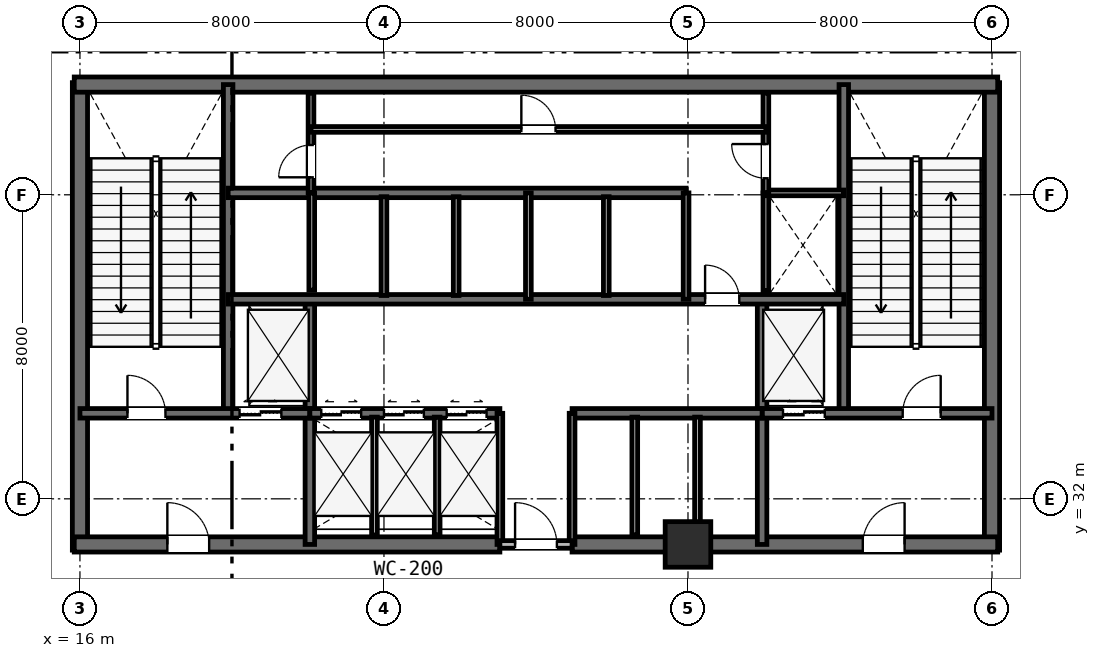
"""IFC4 building model, lengths in metres.
Left out: names, types, materials, properties, quantities, classifications, styles, units other than length and angle.
Written with IfcOpenShell. Run it as: python <this file> out.ifc"""

import sys

from ifc_helpers import new_model, si_unit, direction, frame, frame_2d, origin, origin_2d, place, context, subcontext, project, spatial, rectangle, extrude, element, fill, save


model = new_model("IFC4")
c1 = context("Model", 3, precision=1e-05, world=origin(), true_north=direction((0.0, 1.0)))
c2 = subcontext(c1, "Body", "Model", "MODEL_VIEW")
j1 = project(units=[si_unit("LENGTHUNIT", "METRE"), si_unit("PLANEANGLEUNIT", "RADIAN")], contexts=[c1])
p1 = place(None, origin())
s1 = spatial("IfcSite", under=j1, at=p1, CompositionType="ELEMENT")
p2 = place(p1, origin())
s2 = spatial("IfcBuilding", under=s1, at=p2, CompositionType="ELEMENT")
p3 = place(p2, frame((0.0, 0.0, -5.6)))
s3 = spatial("IfcBuildingStorey", under=s2, at=p3, CompositionType="ELEMENT", Elevation=-5.6)
for number, where, z_axis, x_axis in (
    (1, (16.0, 30.65, 0.0), (0.0, 0.0, 1.0), (0.0, 1.0, 0.0)),
    (2, (40.0, 30.65, 0.0), (0.0, 0.0, 1.0), (0.0, 1.0, 0.0)),
):
    element("IfcWall", number, at=place(p3, frame(where, z_axis=z_axis, x_axis=x_axis)), inside=s3, PredefinedType="SHEAR", context=c2, shape_type="SweptSolid", body=[
        extrude(rectangle(XDim=12.3, YDim=0.4, at=frame_2d((6.15, 0.0))), origin(), (0.0, 0.0, 1.0), 5.6),
    ])
p4 = place(p3, frame((15.85, 42.9, 0.0), z_axis=(0.0, 0.0, 1.0), x_axis=(1.0, 0.0, 0.0)))
e3 = element("IfcWall", 3, at=p4, inside=s3, PredefinedType="SHEAR", context=c2, shape_type="SweptSolid", body=[
    extrude(rectangle(XDim=24.3, YDim=0.4, at=frame_2d((12.15, 0.0))), origin(), (0.0, 0.0, 1.0), 5.6),
])
p5 = place(p3, frame((15.85, 30.8, 0.0), z_axis=(0.0, 0.0, 1.0), x_axis=(1.0, 0.0, 0.0)))
e4 = element("IfcWall", 4, at=p5, inside=s3, PredefinedType="SHEAR", context=c2, shape_type="SweptSolid", body=[
    extrude(rectangle(XDim=11.2, YDim=0.4, at=frame_2d((5.6, 0.0))), origin(), (0.0, 0.0, 1.0), 5.6),
])
p6 = place(p5, frame((2.45, 0.0, 0.0)))
e5 = element("IfcOpeningElement", 5, at=p6, cuts=e4, PredefinedType="OPENING", context=c2, shape_type="SweptSolid", body=[
    extrude(rectangle(XDim=1.1, YDim=2.15, at=frame_2d((0.55, 1.075))), frame((0.0, 0.21, 0.0), z_axis=(0.0, -1.0, 0.0), x_axis=(1.0, 0.0, 0.0)), (0.0, 0.0, 1.0), 0.42),
])
p7 = place(p3, frame((28.95, 30.8, 0.0), z_axis=(0.0, 0.0, 1.0), x_axis=(1.0, 0.0, 0.0)))
e6 = element("IfcWall", 6, at=p7, inside=s3, PredefinedType="SHEAR", context=c2, shape_type="SweptSolid", body=[
    extrude(rectangle(XDim=11.2, YDim=0.4, at=frame_2d((5.6, 0.0))), origin(), (0.0, 0.0, 1.0), 5.6),
])
p8 = place(p7, frame((7.65, 0.0, 0.0)))
e7 = element("IfcOpeningElement", 7, at=p8, cuts=e6, PredefinedType="OPENING", context=c2, shape_type="SweptSolid", body=[
    extrude(rectangle(XDim=1.1, YDim=2.15, at=frame_2d((0.55, 1.075))), frame((0.0, 0.21, 0.0), z_axis=(0.0, -1.0, 0.0), x_axis=(1.0, 0.0, 0.0)), (0.0, 0.0, 1.0), 0.42),
])
for number, where, z_axis, x_axis in (
    (8, (19.9, 34.25, 0.0), (0.0, 0.0, 1.0), (0.0, 1.0, 0.0)),
    (9, (36.1, 34.25, 0.0), (0.0, 0.0, 1.0), (0.0, 1.0, 0.0)),
):
    element("IfcWall", number, at=place(p3, frame(where, z_axis=z_axis, x_axis=x_axis)), inside=s3, PredefinedType="SHEAR", context=c2, shape_type="SweptSolid", body=[
        extrude(rectangle(XDim=8.65, YDim=0.25, at=frame_2d((4.325, 0.0))), origin(), (0.0, 0.0, 1.0), 5.6),
    ])
for number, where, z_axis, x_axis in (
    (10, (22.05, 30.8, 0.0), (0.0, 0.0, 1.0), (0.0, 1.0, 0.0)),
    (11, (33.95, 30.8, 0.0), (0.0, 0.0, 1.0), (0.0, 1.0, 0.0)),
):
    element("IfcWall", number, at=place(p3, frame(where, z_axis=z_axis, x_axis=x_axis)), inside=s3, PredefinedType="SHEAR", context=c2, shape_type="SweptSolid", body=[
        extrude(rectangle(XDim=6.45, YDim=0.25, at=frame_2d((3.225, 0.0))), origin(), (0.0, 0.0, 1.0), 5.6),
    ])
p9 = place(p3, frame((16.0, 34.25, 0.0), z_axis=(0.0, 0.0, 1.0), x_axis=(1.0, 0.0, 0.0)))
e12 = element("IfcWall", 12, at=p9, inside=s3, PredefinedType="SHEAR", context=c2, shape_type="SweptSolid", body=[
    extrude(rectangle(XDim=6.05, YDim=0.25, at=frame_2d((3.025, 0.0))), origin(), (0.0, 0.0, 1.0), 5.6),
])
p10 = place(p9, frame((1.25, 0.0, 0.0)))
e13 = element("IfcOpeningElement", 13, at=p10, cuts=e12, PredefinedType="OPENING", context=c2, shape_type="SweptSolid", body=[
    extrude(rectangle(XDim=1.0, YDim=2.15, at=frame_2d((0.5, 1.075))), frame((0.0, 0.135, 0.0), z_axis=(0.0, -1.0, 0.0), x_axis=(1.0, 0.0, 0.0)), (0.0, 0.0, 1.0), 0.27),
])
p11 = place(p9, frame((4.2, 0.0, 0.0)))
e14 = element("IfcOpeningElement", 14, at=p11, cuts=e12, PredefinedType="OPENING", context=c2, shape_type="SweptSolid", body=[
    extrude(rectangle(XDim=1.1, YDim=2.15, at=frame_2d((0.55, 1.075))), frame((0.0, 0.135, 0.0), z_axis=(0.0, -1.0, 0.0), x_axis=(1.0, 0.0, 0.0)), (0.0, 0.0, 1.0), 0.27),
])
p12 = place(p3, frame((33.95, 34.25, 0.0), z_axis=(0.0, 0.0, 1.0), x_axis=(1.0, 0.0, 0.0)))
e15 = element("IfcWall", 15, at=p12, inside=s3, PredefinedType="SHEAR", context=c2, shape_type="SweptSolid", body=[
    extrude(rectangle(XDim=6.05, YDim=0.25, at=frame_2d((3.025, 0.0))), origin(), (0.0, 0.0, 1.0), 5.6),
])
p13 = place(p12, frame((3.7, 0.0, 0.0)))
e16 = element("IfcOpeningElement", 16, at=p13, cuts=e15, PredefinedType="OPENING", context=c2, shape_type="SweptSolid", body=[
    extrude(rectangle(XDim=1.0, YDim=2.15, at=frame_2d((0.5, 1.075))), frame((0.0, 0.135, 0.0), z_axis=(0.0, -1.0, 0.0), x_axis=(1.0, 0.0, 0.0)), (0.0, 0.0, 1.0), 0.27),
])
p14 = place(p12, frame((0.55, 0.0, 0.0)))
e17 = element("IfcOpeningElement", 17, at=p14, cuts=e15, PredefinedType="OPENING", context=c2, shape_type="SweptSolid", body=[
    extrude(rectangle(XDim=1.1, YDim=2.15, at=frame_2d((0.55, 1.075))), frame((0.0, 0.135, 0.0), z_axis=(0.0, -1.0, 0.0), x_axis=(1.0, 0.0, 0.0)), (0.0, 0.0, 1.0), 0.27),
])
p15 = place(p3, frame((22.05, 34.25, 0.0), z_axis=(0.0, 0.0, 1.0), x_axis=(1.0, 0.0, 0.0)))
e18 = element("IfcWall", 18, at=p15, inside=s3, PredefinedType="SHEAR", context=c2, shape_type="SweptSolid", body=[
    extrude(rectangle(XDim=5.0, YDim=0.25, at=frame_2d((2.5, 0.0))), origin(), (0.0, 0.0, 1.0), 5.6),
])
p16 = place(p15, frame((0.3, 0.0, 0.0)))
e19 = element("IfcOpeningElement", 19, at=p16, cuts=e18, PredefinedType="OPENING", context=c2, shape_type="SweptSolid", body=[
    extrude(rectangle(XDim=1.05, YDim=2.15, at=frame_2d((0.525, 1.075))), frame((0.0, 0.135, 0.0), z_axis=(0.0, -1.0, 0.0), x_axis=(1.0, 0.0, 0.0)), (0.0, 0.0, 1.0), 0.27),
])
p17 = place(p15, frame((1.95, 0.0, 0.0)))
e20 = element("IfcOpeningElement", 20, at=p17, cuts=e18, PredefinedType="OPENING", context=c2, shape_type="SweptSolid", body=[
    extrude(rectangle(XDim=1.05, YDim=2.15, at=frame_2d((0.525, 1.075))), frame((0.0, 0.135, 0.0), z_axis=(0.0, -1.0, 0.0), x_axis=(1.0, 0.0, 0.0)), (0.0, 0.0, 1.0), 0.27),
])
p18 = place(p15, frame((3.6, 0.0, 0.0)))
e21 = element("IfcOpeningElement", 21, at=p18, cuts=e18, PredefinedType="OPENING", context=c2, shape_type="SweptSolid", body=[
    extrude(rectangle(XDim=1.05, YDim=2.15, at=frame_2d((0.525, 1.075))), frame((0.0, 0.135, 0.0), z_axis=(0.0, -1.0, 0.0), x_axis=(1.0, 0.0, 0.0)), (0.0, 0.0, 1.0), 0.27),
])
p19 = place(p3, frame((28.95, 34.25, 0.0), z_axis=(0.0, 0.0, 1.0), x_axis=(1.0, 0.0, 0.0)))
e22 = element("IfcWall", 22, at=p19, inside=s3, PredefinedType="SHEAR", context=c2, shape_type="SweptSolid", body=[
    extrude(rectangle(XDim=5.0, YDim=0.25, at=frame_2d((2.5, 0.0))), origin(), (0.0, 0.0, 1.0), 5.6),
])
p20 = place(p3, frame((19.9, 37.25, 0.0), z_axis=(0.0, 0.0, 1.0), x_axis=(1.0, 0.0, 0.0)))
e23 = element("IfcWall", 23, at=p20, inside=s3, PredefinedType="SHEAR", context=c2, shape_type="SweptSolid", body=[
    extrude(rectangle(XDim=16.2, YDim=0.25, at=frame_2d((8.1, 0.0))), origin(), (0.0, 0.0, 1.0), 5.6),
])
p21 = place(p20, frame((12.55, 0.0, 0.0)))
e24 = element("IfcOpeningElement", 24, at=p21, cuts=e23, PredefinedType="OPENING", context=c2, shape_type="SweptSolid", body=[
    extrude(rectangle(XDim=0.9, YDim=2.15, at=frame_2d((0.45, 1.075))), frame((0.0, 0.135, 0.0), z_axis=(0.0, -1.0, 0.0), x_axis=(1.0, 0.0, 0.0)), (0.0, 0.0, 1.0), 0.27),
])
p22 = place(p3, frame((19.9, 40.05, 0.0), z_axis=(0.0, 0.0, 1.0), x_axis=(1.0, 0.0, 0.0)))
e25 = element("IfcWall", 25, at=p22, inside=s3, PredefinedType="SHEAR", context=c2, shape_type="SweptSolid", body=[
    extrude(rectangle(XDim=12.05, YDim=0.25, at=frame_2d((6.025, 0.0))), origin(), (0.0, 0.0, 1.0), 5.6),
])
p23 = place(p3, frame((32.0, 30.8, 0.0), z_axis=(0.0, 0.0, 1.0), x_axis=(1.0, 0.0, 0.0)))
e26 = element("IfcColumn", 26, at=p23, inside=s3, PredefinedType="COLUMN", context=c2, shape_type="SweptSolid", body=[
    extrude(rectangle(XDim=1.2, YDim=1.2, at=origin_2d()), origin(), (0.0, 0.0, 1.0), 5.6),
])
p24 = place(p3, frame((27.05, 30.8, 0.0), z_axis=(0.0, 0.0, 1.0), x_axis=(0.0, 1.0, 0.0)))
e27 = element("IfcWall", 27, at=p24, inside=s3, PredefinedType="PLUMBINGWALL", context=c2, shape_type="SweptSolid", body=[
    extrude(rectangle(XDim=3.45, YDim=0.15, at=frame_2d((1.725, 0.0))), origin(), (0.0, 0.0, 1.0), 5.01),
])
p25 = place(p3, frame((28.95, 30.8, 0.0), z_axis=(0.0, 0.0, 1.0), x_axis=(0.0, 1.0, 0.0)))
e28 = element("IfcWall", 28, at=p25, inside=s3, PredefinedType="PLUMBINGWALL", context=c2, shape_type="SweptSolid", body=[
    extrude(rectangle(XDim=3.45, YDim=0.15, at=frame_2d((1.725, 0.0))), origin(), (0.0, 0.0, 1.0), 4.76),
])
p26 = place(p3, frame((27.05, 30.8, 0.0), z_axis=(0.0, 0.0, 1.0), x_axis=(1.0, 0.0, 0.0)))
e29 = element("IfcWall", 29, at=p26, inside=s3, PredefinedType="PARTITIONING", context=c2, shape_type="SweptSolid", body=[
    extrude(rectangle(XDim=1.9, YDim=0.2, at=frame_2d((0.95, 0.0))), origin(), (0.0, 0.0, 1.0), 4.76),
])
p27 = place(p26, frame((0.4, 0.0, 0.0)))
e30 = element("IfcOpeningElement", 30, at=p27, cuts=e29, PredefinedType="OPENING", context=c2, shape_type="SweptSolid", body=[
    extrude(rectangle(XDim=1.1, YDim=2.15, at=frame_2d((0.55, 1.075))), frame((0.0, 0.11, 0.0), z_axis=(0.0, -1.0, 0.0), x_axis=(1.0, 0.0, 0.0)), (0.0, 0.0, 1.0), 0.22),
])
for number, where, z_axis, x_axis in (
    (31, (23.75, 31.05, 0.0), (0.0, 0.0, 1.0), (0.0, 1.0, 0.0)),
    (32, (25.4, 31.05, 0.0), (0.0, 0.0, 1.0), (0.0, 1.0, 0.0)),
    (33, (30.6, 31.05, 0.0), (0.0, 0.0, 1.0), (0.0, 1.0, 0.0)),
):
    element("IfcWall", number, at=place(p3, frame(where, z_axis=z_axis, x_axis=x_axis)), inside=s3, PredefinedType="PLUMBINGWALL", context=c2, shape_type="SweptSolid", body=[
        extrude(rectangle(XDim=3.1, YDim=0.15, at=frame_2d((1.55, 0.0))), origin(), (0.0, 0.0, 1.0), 5.27),
    ])
p28 = place(p3, frame((32.25, 31.05, 0.0), z_axis=(0.0, 0.0, 1.0), x_axis=(0.0, 1.0, 0.0)))
e34 = element("IfcWall", 34, at=p28, inside=s3, PredefinedType="PLUMBINGWALL", context=c2, shape_type="SweptSolid", body=[
    extrude(rectangle(XDim=3.1, YDim=0.15, at=frame_2d((1.55, 0.0))), origin(), (0.0, 0.0, 1.0), 4.66),
])
p29 = place(p3, frame((22.1, 37.49, 0.0), z_axis=(0.0, 0.0, 1.0), x_axis=(0.0, 1.0, 0.0)))
e35 = element("IfcWall", 35, at=p29, inside=s3, PredefinedType="PLUMBINGWALL", context=c2, shape_type="SweptSolid", body=[
    extrude(rectangle(XDim=2.56, YDim=0.15, at=frame_2d((1.28, 0.0))), origin(), (0.0, 0.0, 1.0), 5.27),
])
p30 = place(p3, frame((27.8, 37.25, 0.0), z_axis=(0.0, 0.0, 1.0), x_axis=(0.0, 1.0, 0.0)))
e36 = element("IfcWall", 36, at=p30, inside=s3, PredefinedType="PLUMBINGWALL", context=c2, shape_type="SweptSolid", body=[
    extrude(rectangle(XDim=2.8, YDim=0.15, at=frame_2d((1.4, 0.0))), origin(), (0.0, 0.0, 1.0), 5.27),
])
for number, where, z_axis, x_axis in (
    (37, (24.0, 37.35, 0.0), (0.0, 0.0, 1.0), (0.0, 1.0, 0.0)),
    (38, (25.9, 37.35, 0.0), (0.0, 0.0, 1.0), (0.0, 1.0, 0.0)),
):
    element("IfcWall", number, at=place(p3, frame(where, z_axis=z_axis, x_axis=x_axis)), inside=s3, PredefinedType="PLUMBINGWALL", context=c2, shape_type="SweptSolid", body=[
        extrude(rectangle(XDim=2.6, YDim=0.15, at=frame_2d((1.3, 0.0))), origin(), (0.0, 0.0, 1.0), 5.27),
    ])
p31 = place(p3, frame((31.95, 37.25, 0.0), z_axis=(0.0, 0.0, 1.0), x_axis=(0.0, 1.0, 0.0)))
e39 = element("IfcWall", 39, at=p31, inside=s3, PredefinedType="PLUMBINGWALL", context=c2, shape_type="SweptSolid", body=[
    extrude(rectangle(XDim=2.8, YDim=0.15, at=frame_2d((1.4, 0.0))), origin(), (0.0, 0.0, 1.0), 5.27),
])
p32 = place(p3, frame((29.85, 37.35, 0.0), z_axis=(0.0, 0.0, 1.0), x_axis=(0.0, 1.0, 0.0)))
e40 = element("IfcWall", 40, at=p32, inside=s3, PredefinedType="PLUMBINGWALL", context=c2, shape_type="SweptSolid", body=[
    extrude(rectangle(XDim=2.6, YDim=0.15, at=frame_2d((1.3, 0.0))), origin(), (0.0, 0.0, 1.0), 5.27),
])
p33 = place(p3, frame((34.05, 37.473, 0.0), z_axis=(0.0, 0.0, 1.0), x_axis=(0.0, 1.0, 0.0)))
e41 = element("IfcWall", 41, at=p33, inside=s3, PredefinedType="PLUMBINGWALL", context=c2, shape_type="SweptSolid", body=[
    extrude(rectangle(XDim=2.577, YDim=0.15, at=frame_2d((1.288, 0.0))), origin(), (0.0, 0.0, 1.0), 5.27),
])
p34 = place(p3, frame((34.05, 40.05, 0.0), z_axis=(0.0, 0.0, 1.0), x_axis=(1.0, 0.0, 0.0)))
e42 = element("IfcWall", 42, at=p34, inside=s3, PredefinedType="PARTITIONING", context=c2, shape_type="SweptSolid", body=[
    extrude(rectangle(XDim=2.05, YDim=0.15, at=frame_2d((1.025, 0.0))), origin(), (0.0, 0.0, 1.0), 5.27),
])
p35 = place(p3, frame((34.05, 40.05, 0.0), z_axis=(0.0, 0.0, 1.0), x_axis=(0.0, 1.0, 0.0)))
e43 = element("IfcWall", 43, at=p35, inside=s3, PredefinedType="PARTITIONING", context=c2, shape_type="SweptSolid", body=[
    extrude(rectangle(XDim=2.63, YDim=0.15, at=frame_2d((1.315, 0.0))), origin(), (0.0, 0.0, 1.0), 5.27),
])
p36 = place(p35, frame((0.385, 0.0, 0.0)))
e44 = element("IfcOpeningElement", 44, at=p36, cuts=e43, PredefinedType="OPENING", context=c2, shape_type="SweptSolid", body=[
    extrude(rectangle(XDim=0.9, YDim=2.15, at=frame_2d((0.45, 1.075))), frame((0.0, 0.085, 0.0), z_axis=(0.0, -1.0, 0.0), x_axis=(1.0, 0.0, 0.0)), (0.0, 0.0, 1.0), 0.17),
])
p37 = place(p3, frame((22.08, 40.05, 0.0), z_axis=(0.0, 0.0, 1.0), x_axis=(0.0, 1.0, 0.0)))
e45 = element("IfcWall", 45, at=p37, inside=s3, PredefinedType="PARTITIONING", context=c2, shape_type="SweptSolid", body=[
    extrude(rectangle(XDim=2.63, YDim=0.15, at=frame_2d((1.315, 0.0))), origin(), (0.0, 0.0, 1.0), 5.27),
])
p38 = place(p37, frame((0.41, 0.0, 0.0)))
e46 = element("IfcOpeningElement", 46, at=p38, cuts=e45, PredefinedType="OPENING", context=c2, shape_type="SweptSolid", body=[
    extrude(rectangle(XDim=0.85, YDim=2.15, at=frame_2d((0.425, 1.075))), frame((0.0, 0.085, 0.0), z_axis=(0.0, -1.0, 0.0), x_axis=(1.0, 0.0, 0.0)), (0.0, 0.0, 1.0), 0.17),
])
p39 = place(p3, frame((22.08, 41.72, 0.0), z_axis=(0.0, 0.0, 1.0), x_axis=(1.0, 0.0, 0.0)))
e47 = element("IfcWall", 47, at=p39, inside=s3, PredefinedType="PARTITIONING", context=c2, shape_type="SweptSolid", body=[
    extrude(rectangle(XDim=11.97, YDim=0.15, at=frame_2d((5.985, 0.0))), origin(), (0.0, 0.0, 1.0), 5.27),
])
p40 = place(p39, frame((5.535, 0.0, 0.0)))
e48 = element("IfcOpeningElement", 48, at=p40, cuts=e47, PredefinedType="OPENING", context=c2, shape_type="SweptSolid", body=[
    extrude(rectangle(XDim=0.9, YDim=2.15, at=frame_2d((0.45, 1.075))), frame((0.0, 0.085, 0.0), z_axis=(0.0, -1.0, 0.0), x_axis=(1.0, 0.0, 0.0)), (0.0, 0.0, 1.0), 0.17),
])
p41 = place(p27, origin())
e49 = element("IfcDoor", 49, at=p41, inside=s3, OperationType="SINGLE_SWING_LEFT", PredefinedType="DOOR", context=c2, shape_type="SweptSolid", body=[
    extrude(rectangle(XDim=1.1, YDim=2.15, at=frame_2d((0.55, 1.075))), frame((0.0, 0.025, 0.0), z_axis=(0.0, -1.0, 0.0), x_axis=(1.0, 0.0, 0.0)), (0.0, 0.0, 1.0), 0.05),
])
fill(e30, e49)
p42 = place(p10, origin())
e50 = element("IfcDoor", 50, at=p42, inside=s3, OperationType="SINGLE_SWING_LEFT", PredefinedType="DOOR", context=c2, shape_type="SweptSolid", body=[
    extrude(rectangle(XDim=1.0, YDim=2.15, at=frame_2d((0.5, 1.075))), frame((0.0, 0.025, 0.0), z_axis=(0.0, -1.0, 0.0), x_axis=(1.0, 0.0, 0.0)), (0.0, 0.0, 1.0), 0.05),
])
fill(e13, e50)
p43 = place(p13, origin())
e51 = element("IfcDoor", 51, at=p43, inside=s3, OperationType="SINGLE_SWING_RIGHT", PredefinedType="DOOR", context=c2, shape_type="SweptSolid", body=[
    extrude(rectangle(XDim=1.0, YDim=2.15, at=frame_2d((0.5, 1.075))), frame((0.0, 0.025, 0.0), z_axis=(0.0, -1.0, 0.0), x_axis=(1.0, 0.0, 0.0)), (0.0, 0.0, 1.0), 0.05),
])
fill(e16, e51)
p44 = place(p6, origin())
e52 = element("IfcDoor", 52, at=p44, inside=s3, OperationType="SINGLE_SWING_LEFT", PredefinedType="DOOR", context=c2, shape_type="SweptSolid", body=[
    extrude(rectangle(XDim=1.1, YDim=2.15, at=frame_2d((0.55, 1.075))), frame((0.0, 0.025, 0.0), z_axis=(0.0, -1.0, 0.0), x_axis=(1.0, 0.0, 0.0)), (0.0, 0.0, 1.0), 0.05),
])
fill(e5, e52)
p45 = place(p8, origin())
e53 = element("IfcDoor", 53, at=p45, inside=s3, OperationType="SINGLE_SWING_RIGHT", PredefinedType="DOOR", context=c2, shape_type="SweptSolid", body=[
    extrude(rectangle(XDim=1.1, YDim=2.15, at=frame_2d((0.55, 1.075))), frame((0.0, 0.025, 0.0), z_axis=(0.0, -1.0, 0.0), x_axis=(1.0, 0.0, 0.0)), (0.0, 0.0, 1.0), 0.05),
])
fill(e7, e53)
p46 = place(p21, origin())
e54 = element("IfcDoor", 54, at=p46, inside=s3, OperationType="SINGLE_SWING_LEFT", PredefinedType="DOOR", context=c2, shape_type="SweptSolid", body=[
    extrude(rectangle(XDim=0.9, YDim=2.15, at=frame_2d((0.45, 1.075))), frame((0.0, 0.025, 0.0), z_axis=(0.0, -1.0, 0.0), x_axis=(1.0, 0.0, 0.0)), (0.0, 0.0, 1.0), 0.05),
])
fill(e24, e54)
p47 = place(p36, origin())
e55 = element("IfcDoor", 55, at=p47, inside=s3, OperationType="SINGLE_SWING_RIGHT", PredefinedType="DOOR", context=c2, shape_type="SweptSolid", body=[
    extrude(rectangle(XDim=0.9, YDim=2.15, at=frame_2d((0.45, 1.075))), frame((0.0, 0.025, 0.0), z_axis=(0.0, -1.0, 0.0), x_axis=(1.0, 0.0, 0.0)), (0.0, 0.0, 1.0), 0.05),
])
fill(e44, e55)
p48 = place(p38, origin())
e56 = element("IfcDoor", 56, at=p48, inside=s3, OperationType="SINGLE_SWING_LEFT", PredefinedType="DOOR", context=c2, shape_type="SweptSolid", body=[
    extrude(rectangle(XDim=0.85, YDim=2.15, at=frame_2d((0.425, 1.075))), frame((0.0, 0.025, 0.0), z_axis=(0.0, -1.0, 0.0), x_axis=(1.0, 0.0, 0.0)), (0.0, 0.0, 1.0), 0.05),
])
fill(e46, e56)
p49 = place(p40, origin())
e57 = element("IfcDoor", 57, at=p49, inside=s3, OperationType="SINGLE_SWING_LEFT", PredefinedType="DOOR", context=c2, shape_type="SweptSolid", body=[
    extrude(rectangle(XDim=0.9, YDim=2.15, at=frame_2d((0.45, 1.075))), frame((0.0, 0.025, 0.0), z_axis=(0.0, -1.0, 0.0), x_axis=(1.0, 0.0, 0.0)), (0.0, 0.0, 1.0), 0.05),
])
fill(e48, e57)
p50 = place(p11, origin())
e58 = element("IfcDoor", 58, at=p50, inside=s3, OperationType="DOUBLE_DOOR_SLIDING", PredefinedType="DOOR", context=c2, shape_type="SweptSolid", body=[
    extrude(rectangle(XDim=1.1, YDim=2.15, at=frame_2d((0.55, 1.075))), frame((0.0, 0.025, 0.0), z_axis=(0.0, -1.0, 0.0), x_axis=(1.0, 0.0, 0.0)), (0.0, 0.0, 1.0), 0.05),
])
fill(e14, e58)
p51 = place(p14, origin())
e59 = element("IfcDoor", 59, at=p51, inside=s3, OperationType="DOUBLE_DOOR_SLIDING", PredefinedType="DOOR", context=c2, shape_type="SweptSolid", body=[
    extrude(rectangle(XDim=1.1, YDim=2.15, at=frame_2d((0.55, 1.075))), frame((0.0, 0.025, 0.0), z_axis=(0.0, -1.0, 0.0), x_axis=(1.0, 0.0, 0.0)), (0.0, 0.0, 1.0), 0.05),
])
fill(e17, e59)
p52 = place(p16, origin())
e60 = element("IfcDoor", 60, at=p52, inside=s3, OperationType="DOUBLE_DOOR_SLIDING", PredefinedType="DOOR", context=c2, shape_type="SweptSolid", body=[
    extrude(rectangle(XDim=1.05, YDim=2.15, at=frame_2d((0.525, 1.075))), frame((0.0, 0.025, 0.0), z_axis=(0.0, -1.0, 0.0), x_axis=(1.0, 0.0, 0.0)), (0.0, 0.0, 1.0), 0.05),
])
fill(e19, e60)
p53 = place(p17, origin())
e61 = element("IfcDoor", 61, at=p53, inside=s3, OperationType="DOUBLE_DOOR_SLIDING", PredefinedType="DOOR", context=c2, shape_type="SweptSolid", body=[
    extrude(rectangle(XDim=1.05, YDim=2.15, at=frame_2d((0.525, 1.075))), frame((0.0, 0.025, 0.0), z_axis=(0.0, -1.0, 0.0), x_axis=(1.0, 0.0, 0.0)), (0.0, 0.0, 1.0), 0.05),
])
fill(e20, e61)
p54 = place(p18, origin())
e62 = element("IfcDoor", 62, at=p54, inside=s3, OperationType="DOUBLE_DOOR_SLIDING", PredefinedType="DOOR", context=c2, shape_type="SweptSolid", body=[
    extrude(rectangle(XDim=1.05, YDim=2.15, at=frame_2d((0.525, 1.075))), frame((0.0, 0.025, 0.0), z_axis=(0.0, -1.0, 0.0), x_axis=(1.0, 0.0, 0.0)), (0.0, 0.0, 1.0), 0.05),
])
fill(e21, e62)
save(model, sys.argv[1])
